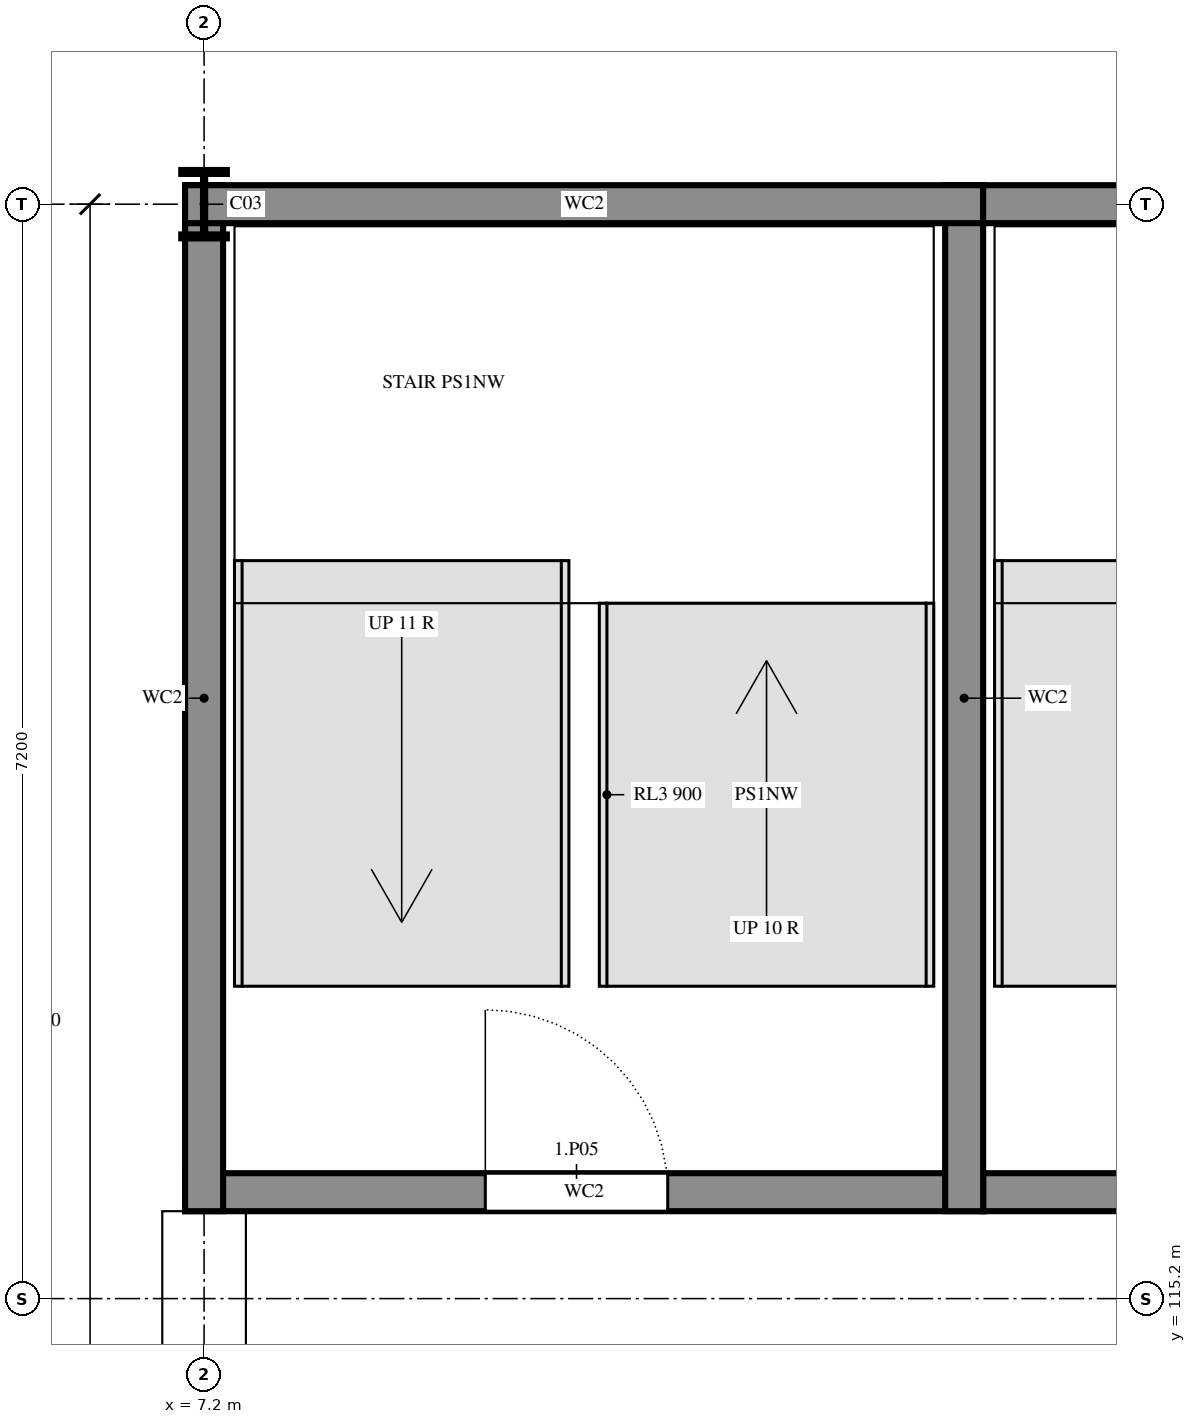
"""IFC4 building model, lengths in metres.
Left out: names, types, materials, properties, quantities, classifications, styles, units other than length and angle.
Written with IfcOpenShell. Run it as: python <this file> out.ifc"""

import sys

from ifc_helpers import new_model, si_unit, direction, frame, frame_2d, origin, origin_2d, place, context, subcontext, project, spatial, rectangle, i_section, extrude, element, fill, save


model = new_model("IFC4")
c1 = context("Model", 3, precision=1e-05, world=origin(), true_north=direction((0.0, 1.0)))
c2 = subcontext(c1, "Body", "Model", "MODEL_VIEW")
j1 = project(units=[si_unit("LENGTHUNIT", "METRE"), si_unit("PLANEANGLEUNIT", "RADIAN")], contexts=[c1])
p1 = place(None, origin())
s1 = spatial("IfcSite", under=j1, at=p1, CompositionType="ELEMENT")
p2 = place(p1, origin())
s2 = spatial("IfcBuilding", under=s1, at=p2, CompositionType="ELEMENT")
p3 = place(p2, frame((0.0, 0.0, 3.6)))
s3 = spatial("IfcBuildingStorey", under=s2, at=p3, CompositionType="ELEMENT", Elevation=3.6)
p4 = place(p3, frame((7.2, 122.4, 0.0), z_axis=(0.0, 0.0, 1.0), x_axis=(1.0, 0.0, 0.0)))
e1 = element("IfcColumn", 1, at=p4, inside=s3, PredefinedType="COLUMN", context=c2, shape_type="SweptSolid", body=[
    extrude(i_section(OverallWidth=0.3, OverallDepth=0.45, WebThickness=0.014, FlangeThickness=0.026, FilletRadius=0.027, at=origin_2d()), origin(), (0.0, 0.0, 1.0), 3.6),
])
p5 = place(p3, frame((7.075, 115.9, 0.0), z_axis=(0.0, 0.0, 1.0), x_axis=(1.0, 0.0, 0.0)))
e2 = element("IfcWall", 2, at=p5, inside=s3, PredefinedType="SHEAR", context=c2, shape_type="SweptSolid", body=[
    extrude(rectangle(XDim=5.25, YDim=0.25, at=frame_2d((2.625, 0.0))), origin(), (0.0, 0.0, 1.0), 3.6),
])
p6 = place(p5, frame((1.975, 0.0, 0.0)))
e3 = element("IfcOpeningElement", 3, at=p6, cuts=e2, PredefinedType="OPENING", context=c2, shape_type="SweptSolid", body=[
    extrude(rectangle(XDim=1.2, YDim=2.4, at=frame_2d((0.6, 1.2))), frame((0.0, 0.135, 0.0), z_axis=(0.0, -1.0, 0.0), x_axis=(1.0, 0.0, 0.0)), (0.0, 0.0, 1.0), 0.27),
])
p7 = place(p3, frame((12.325, 115.9, 0.0), z_axis=(0.0, 0.0, 1.0), x_axis=(1.0, 0.0, 0.0)))
e4 = element("IfcWall", 4, at=p7, inside=s3, PredefinedType="SHEAR", context=c2, shape_type="SweptSolid", body=[
    extrude(rectangle(XDim=5.0, YDim=0.25, at=frame_2d((2.5, 0.0))), origin(), (0.0, 0.0, 1.0), 3.6),
])
p8 = place(p7, frame((1.75, 0.0, 0.0)))
e5 = element("IfcOpeningElement", 5, at=p8, cuts=e4, PredefinedType="OPENING", context=c2, shape_type="SweptSolid", body=[
    extrude(rectangle(XDim=1.2, YDim=2.4, at=frame_2d((0.6, 1.2))), frame((0.0, 0.135, 0.0), z_axis=(0.0, -1.0, 0.0), x_axis=(1.0, 0.0, 0.0)), (0.0, 0.0, 1.0), 0.27),
])
for number, where, z_axis, x_axis in (
    (6, (12.2, 115.775, 0.0), (0.0, 0.0, 1.0), (0.0, 1.0, 0.0)),
    (7, (7.2, 122.525, 0.0), (0.0, 0.0, 1.0), (0.0, -1.0, 0.0)),
):
    element("IfcWall", number, at=place(p3, frame(where, z_axis=z_axis, x_axis=x_axis)), inside=s3, PredefinedType="SHEAR", context=c2, shape_type="SweptSolid", body=[
        extrude(rectangle(XDim=6.75, YDim=0.25, at=frame_2d((3.375, 0.0))), origin(), (0.0, 0.0, 1.0), 3.6),
    ])
p9 = place(p3, frame((12.325, 122.4, 0.0), z_axis=(0.0, 0.0, 1.0), x_axis=(-1.0, 0.0, 0.0)))
e8 = element("IfcWall", 8, at=p9, inside=s3, PredefinedType="SHEAR", context=c2, shape_type="SweptSolid", body=[
    extrude(rectangle(XDim=5.25, YDim=0.25, at=frame_2d((2.625, 0.0))), origin(), (0.0, 0.0, 1.0), 3.6),
])
p10 = place(p3, frame((17.325, 122.4, 0.0), z_axis=(0.0, 0.0, 1.0), x_axis=(-1.0, 0.0, 0.0)))
e9 = element("IfcWall", 9, at=p10, inside=s3, PredefinedType="SHEAR", context=c2, shape_type="SweptSolid", body=[
    extrude(rectangle(XDim=5.0, YDim=0.25, at=frame_2d((2.5, 0.0))), origin(), (0.0, 0.0, 1.0), 3.6),
])
p11 = place(p3, frame((7.2, 60.525, 0.0), z_axis=(0.0, 0.0, 1.0), x_axis=(0.0, 1.0, 0.0)))
e10 = element("IfcWall", 10, at=p11, inside=s3, PredefinedType="SOLIDWALL", context=c2, shape_type="SweptSolid", body=[
    extrude(rectangle(XDim=55.25, YDim=0.55, at=frame_2d((27.625, 0.0))), origin(), (0.0, 0.0, 1.0), 3.6),
])
p12 = place(p6, origin())
e11 = element("IfcDoor", 11, at=p12, inside=s3, OperationType="SINGLE_SWING_RIGHT", PredefinedType="DOOR", context=c2, shape_type="SweptSolid", body=[
    extrude(rectangle(XDim=1.2, YDim=2.4, at=frame_2d((0.6, 1.2))), frame((0.0, 0.025, 0.0), z_axis=(0.0, -1.0, 0.0), x_axis=(1.0, 0.0, 0.0)), (0.0, 0.0, 1.0), 0.05),
])
fill(e3, e11)
save(model, sys.argv[1])
